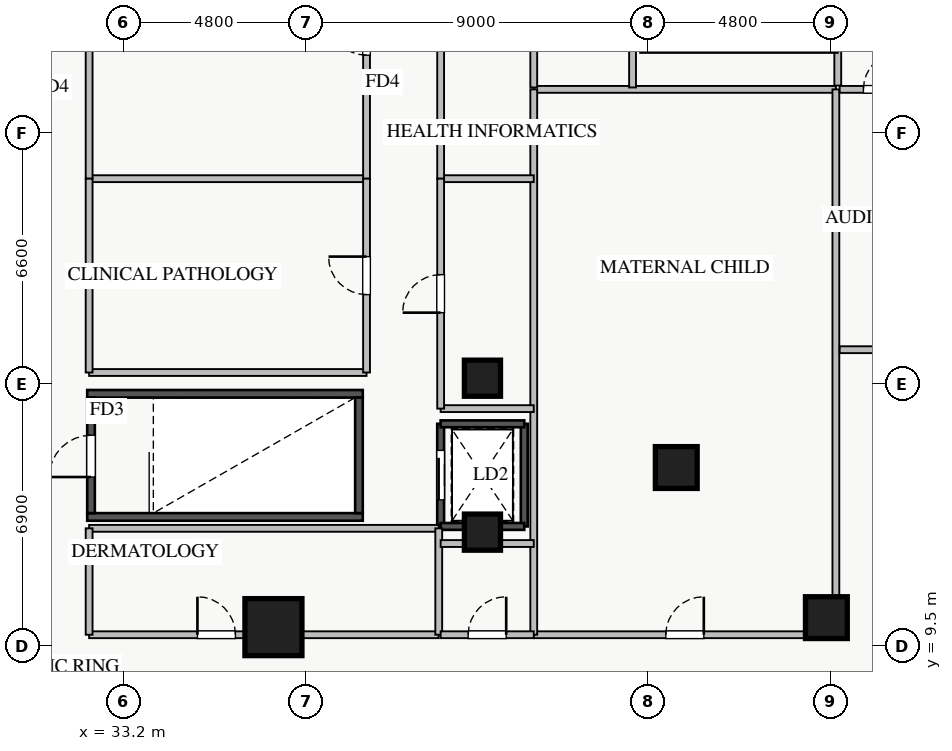
"""IFC4 building model, lengths in metres.
Left out: names, types, materials, properties, quantities, classifications, styles, units other than length and angle.
Written with IfcOpenShell. Run it as: python <this file> out.ifc"""

import sys

from ifc_helpers import new_model, si_unit, direction, frame, frame_2d, origin, origin_2d, place, context, subcontext, project, spatial, rectangle, extrude, source, transform, mapped, element, fill, save


model = new_model("IFC4")
c1 = context("Model", 3, precision=1e-05, world=origin(), true_north=direction((0.0, 1.0)))
c2 = subcontext(c1, "Body", "Model", "MODEL_VIEW")
j1 = project(units=[si_unit("LENGTHUNIT", "METRE"), si_unit("PLANEANGLEUNIT", "RADIAN")], contexts=[c1])
p1 = place(None, origin())
s1 = spatial("IfcSite", under=j1, at=p1, CompositionType="ELEMENT")
p2 = place(p1, origin())
s2 = spatial("IfcBuilding", under=s1, at=p2, CompositionType="ELEMENT")
p3 = place(p2, frame((0.0, 0.0, 18.2)))
s3 = spatial("IfcBuildingStorey", under=s2, at=p3, CompositionType="ELEMENT", Elevation=18.2)
p4 = place(p3, frame((41.55, 12.65, 0.0), z_axis=(0.0, 0.0, 1.0), x_axis=(0.0, 1.0, 0.0)))
e1 = element("IfcWall", 1, at=p4, inside=s3, PredefinedType="SHEAR", context=c2, shape_type="SweptSolid", body=[
    extrude(rectangle(XDim=2.7, YDim=0.18, at=frame_2d((1.35, 0.0))), origin(), (0.0, 0.0, 1.0), 4.62),
])
p5 = place(p4, frame((0.7, 0.0, 0.0)))
e2 = element("IfcOpeningElement", 2, at=p5, cuts=e1, PredefinedType="OPENING", context=c2, shape_type="SweptSolid", body=[
    extrude(rectangle(XDim=1.3, YDim=2.05, at=frame_2d((0.65, 1.025))), frame((0.0, 0.1, 0.0), z_axis=(0.0, -1.0, 0.0), x_axis=(1.0, 0.0, 0.0)), (0.0, 0.0, 1.0), 0.2),
])
p6 = place(p3, frame((43.75, 12.65, 0.0), z_axis=(0.0, 0.0, 1.0), x_axis=(0.0, 1.0, 0.0)))
e3 = element("IfcWall", 3, at=p6, inside=s3, PredefinedType="SHEAR", context=c2, shape_type="SweptSolid", body=[
    extrude(rectangle(XDim=2.7, YDim=0.18, at=frame_2d((1.35, 0.0))), origin(), (0.0, 0.0, 1.0), 4.62),
])
for number, where, z_axis, x_axis in (
    (4, (41.55, 12.65, 0.0), (0.0, 0.0, 1.0), (1.0, 0.0, 0.0)),
    (5, (41.55, 15.35, 0.0), (0.0, 0.0, 1.0), (1.0, 0.0, 0.0)),
):
    element("IfcWall", number, at=place(p3, frame(where, z_axis=z_axis, x_axis=x_axis)), inside=s3, PredefinedType="SHEAR", context=c2, shape_type="SweptSolid", body=[
        extrude(rectangle(XDim=2.2, YDim=0.18, at=frame_2d((1.1, 0.0))), origin(), (0.0, 0.0, 1.0), 4.62),
    ])
for number, where, z_axis, x_axis in (
    (6, (32.25, 12.9, 0.0), (0.0, 0.0, 1.0), (1.0, 0.0, 0.0)),
    (7, (32.25, 16.14, 0.0), (0.0, 0.0, 1.0), (1.0, 0.0, 0.0)),
):
    element("IfcWall", number, at=place(p3, frame(where, z_axis=z_axis, x_axis=x_axis)), inside=s3, PredefinedType="SHEAR", context=c2, shape_type="SweptSolid", body=[
        extrude(rectangle(XDim=7.25, YDim=0.2, at=frame_2d((3.625, 0.0))), origin(), (0.0, 0.0, 1.0), 4.8),
    ])
p7 = place(p3, frame((32.35, 13.0, 0.0), z_axis=(0.0, 0.0, 1.0), x_axis=(0.0, 1.0, 0.0)))
e8 = element("IfcWall", 8, at=p7, inside=s3, PredefinedType="SHEAR", context=c2, shape_type="SweptSolid", body=[
    extrude(rectangle(XDim=3.04, YDim=0.2, at=frame_2d((1.52, 0.0))), origin(), (0.0, 0.0, 1.0), 4.8),
])
p8 = place(p7, frame((0.95, 0.0, 0.0)))
e9 = element("IfcOpeningElement", 9, at=p8, cuts=e8, PredefinedType="OPENING", context=c2, shape_type="SweptSolid", body=[
    extrude(rectangle(XDim=1.1, YDim=2.05, at=frame_2d((0.55, 1.025))), frame((0.0, 0.11, 0.0), z_axis=(0.0, -1.0, 0.0), x_axis=(1.0, 0.0, 0.0)), (0.0, 0.0, 1.0), 0.22),
])
p9 = place(p3, frame((39.4, 13.0, 0.0), z_axis=(0.0, 0.0, 1.0), x_axis=(0.0, 1.0, 0.0)))
e10 = element("IfcWall", 10, at=p9, inside=s3, PredefinedType="SHEAR", context=c2, shape_type="SweptSolid", body=[
    extrude(rectangle(XDim=3.04, YDim=0.2, at=frame_2d((1.52, 0.0))), origin(), (0.0, 0.0, 1.0), 4.8),
])
m1 = source(origin(), c2, "Body", "SweptSolid", [
    extrude(rectangle(XDim=1.5, YDim=1.5, at=origin_2d()), origin(), (0.0, 0.0, 1.0), 4.8),
])
p10 = place(p3, frame((37.15, 10.0, 0.0), z_axis=(0.0, 0.0, 1.0), x_axis=(1.0, 0.0, 0.0)))
e11 = element("IfcColumn", 11, at=p10, inside=s3, PredefinedType="COLUMN", context=c2, shape_type="MappedRepresentation", body=[
    mapped(m1, transform((0.0, 0.0, 0.0), x_axis=(1.0, 0.0, 0.0), y_axis=(0.0, 1.0, 0.0), z_axis=(0.0, 0.0, 1.0), scale=1.0)),
])
m2 = source(origin(), c2, "Body", "SweptSolid", [
    extrude(rectangle(XDim=1.1, YDim=1.1, at=origin_2d()), origin(), (0.0, 0.0, 1.0), 4.8),
])
for number, where, z_axis, x_axis in (
    (12, (51.7, 10.25, 0.0), (0.0, 0.0, 1.0), (1.0, 0.0, 0.0)),
    (13, (47.75, 14.2, 0.0), (0.0, 0.0, 1.0), (1.0, 0.0, 0.0)),
):
    element("IfcColumn", number, at=place(p3, frame(where, z_axis=z_axis, x_axis=x_axis)), inside=s3, PredefinedType="COLUMN", context=c2, shape_type="MappedRepresentation", body=[
        mapped(m2, transform((0.0, 0.0, 0.0), x_axis=(1.0, 0.0, 0.0), y_axis=(0.0, 1.0, 0.0), z_axis=(0.0, 0.0, 1.0), scale=1.0)),
    ])
m3 = source(origin(), c2, "Body", "SweptSolid", [
    extrude(rectangle(XDim=0.95, YDim=0.95, at=origin_2d()), origin(), (0.0, 0.0, 1.0), 4.8),
])
for number, where, z_axis, x_axis in (
    (14, (42.65, 12.5, 0.0), (0.0, 0.0, 1.0), (1.0, 0.0, 0.0)),
    (15, (42.65, 16.55, 0.0), (0.0, 0.0, 1.0), (1.0, 0.0, 0.0)),
):
    element("IfcColumn", number, at=place(p3, frame(where, z_axis=z_axis, x_axis=x_axis)), inside=s3, PredefinedType="COLUMN", context=c2, shape_type="MappedRepresentation", body=[
        mapped(m3, transform((0.0, 0.0, 0.0), x_axis=(1.0, 0.0, 0.0), y_axis=(0.0, 1.0, 0.0), z_axis=(0.0, 0.0, 1.0), scale=1.0)),
    ])
p11 = place(p3, frame((52.0, 24.25, 0.0), z_axis=(0.0, 0.0, 1.0), x_axis=(0.0, 1.0, 0.0)))
e16 = element("IfcWall", 16, at=p11, inside=s3, PredefinedType="PARTITIONING", context=c2, shape_type="SweptSolid", body=[
    extrude(rectangle(XDim=11.55, YDim=0.18, at=frame_2d((5.775, 0.0))), origin(), (0.0, 0.0, 1.0), 4.62),
])
p12 = place(p11, frame((2.325, 0.0, 0.0)))
e17 = element("IfcOpeningElement", 17, at=p12, cuts=e16, PredefinedType="OPENING", context=c2, shape_type="SweptSolid", body=[
    extrude(rectangle(XDim=0.85, YDim=2.05, at=frame_2d((0.425, 1.025))), frame((0.0, 0.1, 0.0), z_axis=(0.0, -1.0, 0.0), x_axis=(1.0, 0.0, 0.0)), (0.0, 0.0, 1.0), 0.2),
])
p13 = place(p11, frame((5.93, 0.0, 0.0)))
e18 = element("IfcOpeningElement", 18, at=p13, cuts=e16, PredefinedType="OPENING", context=c2, shape_type="SweptSolid", body=[
    extrude(rectangle(XDim=0.85, YDim=2.05, at=frame_2d((0.425, 1.025))), frame((0.0, 0.1, 0.0), z_axis=(0.0, -1.0, 0.0), x_axis=(1.0, 0.0, 0.0)), (0.0, 0.0, 1.0), 0.2),
])
p14 = place(p11, frame((9.43, 0.0, 0.0)))
e19 = element("IfcOpeningElement", 19, at=p14, cuts=e16, PredefinedType="OPENING", context=c2, shape_type="SweptSolid", body=[
    extrude(rectangle(XDim=0.85, YDim=2.05, at=frame_2d((0.425, 1.025))), frame((0.0, 0.1, 0.0), z_axis=(0.0, -1.0, 0.0), x_axis=(1.0, 0.0, 0.0)), (0.0, 0.0, 1.0), 0.2),
])
p15 = place(p3, frame((46.8, 25.2, 0.0), z_axis=(0.0, 0.0, 1.0), x_axis=(1.0, 0.0, 0.0)))
e20 = element("IfcWall", 20, at=p15, inside=s3, PredefinedType="PARTITIONING", context=c2, shape_type="SweptSolid", body=[
    extrude(rectangle(XDim=5.2, YDim=0.18, at=frame_2d((2.6, 0.0))), origin(), (0.0, 0.0, 1.0), 4.62),
])
p16 = place(p3, frame((32.3, 21.8, 0.0), z_axis=(0.0, 0.0, 1.0), x_axis=(1.0, 0.0, 0.0)))
e21 = element("IfcWall", 21, at=p16, inside=s3, PredefinedType="PARTITIONING", context=c2, shape_type="SweptSolid", body=[
    extrude(rectangle(XDim=7.3, YDim=0.18, at=frame_2d((3.65, 0.0))), origin(), (0.0, 0.0, 1.0), 4.62),
])
p17 = place(p3, frame((32.3, 21.8, 0.0), z_axis=(0.0, 0.0, 1.0), x_axis=(0.0, 1.0, 0.0)))
e22 = element("IfcWall", 22, at=p17, inside=s3, PredefinedType="PARTITIONING", context=c2, shape_type="SweptSolid", body=[
    extrude(rectangle(XDim=7.5, YDim=0.18, at=frame_2d((3.75, 0.0))), origin(), (0.0, 0.0, 1.0), 4.62),
])
p18 = place(p3, frame((39.6, 21.8, 0.0), z_axis=(0.0, 0.0, 1.0), x_axis=(0.0, 1.0, 0.0)))
e23 = element("IfcWall", 23, at=p18, inside=s3, PredefinedType="PARTITIONING", context=c2, shape_type="SweptSolid", body=[
    extrude(rectangle(XDim=7.5, YDim=0.18, at=frame_2d((3.75, 0.0))), origin(), (0.0, 0.0, 1.0), 4.62),
])
p19 = place(p18, frame((3.25, 0.0, 0.0)))
e24 = element("IfcOpeningElement", 24, at=p19, cuts=e23, PredefinedType="OPENING", context=c2, shape_type="SweptSolid", body=[
    extrude(rectangle(XDim=1.0, YDim=2.05, at=frame_2d((0.5, 1.025))), frame((0.0, 0.1, 0.0), z_axis=(0.0, -1.0, 0.0), x_axis=(1.0, 0.0, 0.0)), (0.0, 0.0, 1.0), 0.2),
])
p20 = place(p3, frame((32.3, 16.7, 0.0), z_axis=(0.0, 0.0, 1.0), x_axis=(1.0, 0.0, 0.0)))
e25 = element("IfcWall", 25, at=p20, inside=s3, PredefinedType="PARTITIONING", context=c2, shape_type="SweptSolid", body=[
    extrude(rectangle(XDim=7.3, YDim=0.18, at=frame_2d((3.65, 0.0))), origin(), (0.0, 0.0, 1.0), 3.915),
])
p21 = place(p3, frame((32.3, 16.7, 0.0), z_axis=(0.0, 0.0, 1.0), x_axis=(0.0, 1.0, 0.0)))
e26 = element("IfcWall", 26, at=p21, inside=s3, PredefinedType="PARTITIONING", context=c2, shape_type="SweptSolid", body=[
    extrude(rectangle(XDim=5.1, YDim=0.18, at=frame_2d((2.55, 0.0))), origin(), (0.0, 0.0, 1.0), 4.62),
])
p22 = place(p3, frame((39.6, 16.7, 0.0), z_axis=(0.0, 0.0, 1.0), x_axis=(0.0, 1.0, 0.0)))
e27 = element("IfcWall", 27, at=p22, inside=s3, PredefinedType="PARTITIONING", context=c2, shape_type="SweptSolid", body=[
    extrude(rectangle(XDim=5.1, YDim=0.18, at=frame_2d((2.55, 0.0))), origin(), (0.0, 0.0, 1.0), 4.62),
])
p23 = place(p22, frame((2.05, 0.0, 0.0)))
e28 = element("IfcOpeningElement", 28, at=p23, cuts=e27, PredefinedType="OPENING", context=c2, shape_type="SweptSolid", body=[
    extrude(rectangle(XDim=1.0, YDim=2.05, at=frame_2d((0.5, 1.025))), frame((0.0, 0.1, 0.0), z_axis=(0.0, -1.0, 0.0), x_axis=(1.0, 0.0, 0.0)), (0.0, 0.0, 1.0), 0.2),
])
p24 = place(p3, frame((32.3, 9.8, 0.0), z_axis=(0.0, 0.0, 1.0), x_axis=(1.0, 0.0, 0.0)))
e29 = element("IfcWall", 29, at=p24, inside=s3, PredefinedType="PARTITIONING", context=c2, shape_type="SweptSolid", body=[
    extrude(rectangle(XDim=9.2, YDim=0.18, at=frame_2d((4.6, 0.0))), origin(), (0.0, 0.0, 1.0), 4.62),
])
p25 = place(p24, frame((2.85, 0.0, 0.0)))
e30 = element("IfcOpeningElement", 30, at=p25, cuts=e29, PredefinedType="OPENING", context=c2, shape_type="SweptSolid", body=[
    extrude(rectangle(XDim=1.0, YDim=2.05, at=frame_2d((0.5, 1.025))), frame((0.0, 0.1, 0.0), z_axis=(0.0, -1.0, 0.0), x_axis=(1.0, 0.0, 0.0)), (0.0, 0.0, 1.0), 0.2),
])
p26 = place(p3, frame((32.3, 12.6, 0.0), z_axis=(0.0, 0.0, 1.0), x_axis=(1.0, 0.0, 0.0)))
e31 = element("IfcWall", 31, at=p26, inside=s3, PredefinedType="PARTITIONING", context=c2, shape_type="SweptSolid", body=[
    extrude(rectangle(XDim=9.2, YDim=0.18, at=frame_2d((4.6, 0.0))), origin(), (0.0, 0.0, 1.0), 3.915),
])
for number, where, z_axis, x_axis in (
    (32, (32.3, 9.8, 0.0), (0.0, 0.0, 1.0), (0.0, 1.0, 0.0)),
    (33, (41.5, 9.8, 0.0), (0.0, 0.0, 1.0), (0.0, 1.0, 0.0)),
):
    element("IfcWall", number, at=place(p3, frame(where, z_axis=z_axis, x_axis=x_axis)), inside=s3, PredefinedType="PARTITIONING", context=c2, shape_type="SweptSolid", body=[
        extrude(rectangle(XDim=2.8, YDim=0.18, at=frame_2d((1.4, 0.0))), origin(), (0.0, 0.0, 1.0), 4.62),
    ])
p27 = place(p3, frame((44.0, 9.8, 0.0), z_axis=(0.0, 0.0, 1.0), x_axis=(1.0, 0.0, 0.0)))
e34 = element("IfcWall", 34, at=p27, inside=s3, PredefinedType="PARTITIONING", context=c2, shape_type="SweptSolid", body=[
    extrude(rectangle(XDim=7.95, YDim=0.18, at=frame_2d((3.975, 0.0))), origin(), (0.0, 0.0, 1.0), 4.62),
])
p28 = place(p27, frame((3.475, 0.0, 0.0)))
e35 = element("IfcOpeningElement", 35, at=p28, cuts=e34, PredefinedType="OPENING", context=c2, shape_type="SweptSolid", body=[
    extrude(rectangle(XDim=1.0, YDim=2.05, at=frame_2d((0.5, 1.025))), frame((0.0, 0.1, 0.0), z_axis=(0.0, -1.0, 0.0), x_axis=(1.0, 0.0, 0.0)), (0.0, 0.0, 1.0), 0.2),
])
p29 = place(p3, frame((44.0, 24.15, 0.0), z_axis=(0.0, 0.0, 1.0), x_axis=(1.0, 0.0, 0.0)))
e36 = element("IfcWall", 36, at=p29, inside=s3, PredefinedType="PARTITIONING", context=c2, shape_type="SweptSolid", body=[
    extrude(rectangle(XDim=7.95, YDim=0.18, at=frame_2d((3.975, 0.0))), origin(), (0.0, 0.0, 1.0), 4.62),
])
for number, where, z_axis, x_axis in (
    (37, (44.0, 9.8, 0.0), (0.0, 0.0, 1.0), (0.0, 1.0, 0.0)),
    (38, (51.95, 9.8, 0.0), (0.0, 0.0, 1.0), (0.0, 1.0, 0.0)),
):
    element("IfcWall", number, at=place(p3, frame(where, z_axis=z_axis, x_axis=x_axis)), inside=s3, PredefinedType="PARTITIONING", context=c2, shape_type="SweptSolid", body=[
        extrude(rectangle(XDim=14.35, YDim=0.18, at=frame_2d((7.175, 0.0))), origin(), (0.0, 0.0, 1.0), 4.62),
    ])
for number, where, z_axis, x_axis in (
    (39, (44.0, 24.2, 0.0), (0.0, 0.0, 1.0), (0.0, 1.0, 0.0)),
    (40, (46.6, 24.2, 0.0), (0.0, 0.0, 1.0), (0.0, 1.0, 0.0)),
):
    element("IfcWall", number, at=place(p3, frame(where, z_axis=z_axis, x_axis=x_axis)), inside=s3, PredefinedType="PARTITIONING", context=c2, shape_type="SweptSolid", body=[
        extrude(rectangle(XDim=12.0, YDim=0.18, at=frame_2d((6.0, 0.0))), origin(), (0.0, 0.0, 1.0), 4.62),
    ])
p30 = place(p3, frame((41.55, 21.8, 0.0), z_axis=(0.0, 0.0, 1.0), x_axis=(1.0, 0.0, 0.0)))
e41 = element("IfcWall", 41, at=p30, inside=s3, PredefinedType="PARTITIONING", context=c2, shape_type="SweptSolid", body=[
    extrude(rectangle(XDim=2.45, YDim=0.18, at=frame_2d((1.225, 0.0))), origin(), (0.0, 0.0, 1.0), 4.62),
])
p31 = place(p3, frame((41.55, 21.8, 0.0), z_axis=(0.0, 0.0, 1.0), x_axis=(0.0, 1.0, 0.0)))
e42 = element("IfcWall", 42, at=p31, inside=s3, PredefinedType="PARTITIONING", context=c2, shape_type="SweptSolid", body=[
    extrude(rectangle(XDim=8.45, YDim=0.18, at=frame_2d((4.225, 0.0))), origin(), (0.0, 0.0, 1.0), 4.62),
])
p32 = place(p31, frame((3.725, 0.0, 0.0)))
e43 = element("IfcOpeningElement", 43, at=p32, cuts=e42, PredefinedType="OPENING", context=c2, shape_type="SweptSolid", body=[
    extrude(rectangle(XDim=1.0, YDim=2.05, at=frame_2d((0.5, 1.025))), frame((0.0, 0.1, 0.0), z_axis=(0.0, -1.0, 0.0), x_axis=(1.0, 0.0, 0.0)), (0.0, 0.0, 1.0), 0.2),
])
p33 = place(p3, frame((41.55, 15.75, 0.0), z_axis=(0.0, 0.0, 1.0), x_axis=(1.0, 0.0, 0.0)))
e44 = element("IfcWall", 44, at=p33, inside=s3, PredefinedType="PARTITIONING", context=c2, shape_type="SweptSolid", body=[
    extrude(rectangle(XDim=2.45, YDim=0.18, at=frame_2d((1.225, 0.0))), origin(), (0.0, 0.0, 1.0), 4.62),
])
p34 = place(p3, frame((41.55, 15.75, 0.0), z_axis=(0.0, 0.0, 1.0), x_axis=(0.0, 1.0, 0.0)))
e45 = element("IfcWall", 45, at=p34, inside=s3, PredefinedType="PARTITIONING", context=c2, shape_type="SweptSolid", body=[
    extrude(rectangle(XDim=6.05, YDim=0.18, at=frame_2d((3.025, 0.0))), origin(), (0.0, 0.0, 1.0), 4.62),
])
p35 = place(p34, frame((2.525, 0.0, 0.0)))
e46 = element("IfcOpeningElement", 46, at=p35, cuts=e45, PredefinedType="OPENING", context=c2, shape_type="SweptSolid", body=[
    extrude(rectangle(XDim=1.0, YDim=2.05, at=frame_2d((0.5, 1.025))), frame((0.0, 0.1, 0.0), z_axis=(0.0, -1.0, 0.0), x_axis=(1.0, 0.0, 0.0)), (0.0, 0.0, 1.0), 0.2),
])
p36 = place(p3, frame((41.55, 9.8, 0.0), z_axis=(0.0, 0.0, 1.0), x_axis=(1.0, 0.0, 0.0)))
e47 = element("IfcWall", 47, at=p36, inside=s3, PredefinedType="PARTITIONING", context=c2, shape_type="SweptSolid", body=[
    extrude(rectangle(XDim=2.45, YDim=0.18, at=frame_2d((1.225, 0.0))), origin(), (0.0, 0.0, 1.0), 4.62),
])
p37 = place(p36, frame((0.725, 0.0, 0.0)))
e48 = element("IfcOpeningElement", 48, at=p37, cuts=e47, PredefinedType="OPENING", context=c2, shape_type="SweptSolid", body=[
    extrude(rectangle(XDim=1.0, YDim=2.05, at=frame_2d((0.5, 1.025))), frame((0.0, 0.1, 0.0), z_axis=(0.0, -1.0, 0.0), x_axis=(1.0, 0.0, 0.0)), (0.0, 0.0, 1.0), 0.2),
])
p38 = place(p3, frame((41.55, 12.2, 0.0), z_axis=(0.0, 0.0, 1.0), x_axis=(1.0, 0.0, 0.0)))
e49 = element("IfcWall", 49, at=p38, inside=s3, PredefinedType="PARTITIONING", context=c2, shape_type="SweptSolid", body=[
    extrude(rectangle(XDim=2.45, YDim=0.18, at=frame_2d((1.225, 0.0))), origin(), (0.0, 0.0, 1.0), 3.915),
])
p39 = place(p3, frame((52.05, 17.3, 0.0), z_axis=(0.0, 0.0, 1.0), x_axis=(1.0, 0.0, 0.0)))
e50 = element("IfcWall", 50, at=p39, inside=s3, PredefinedType="PARTITIONING", context=c2, shape_type="SweptSolid", body=[
    extrude(rectangle(XDim=2.25, YDim=0.18, at=frame_2d((1.125, 0.0))), origin(), (0.0, 0.0, 1.0), 4.62),
])
p40 = place(p3, frame((52.05, 24.15, 0.0), z_axis=(0.0, 0.0, 1.0), x_axis=(1.0, 0.0, 0.0)))
e51 = element("IfcWall", 51, at=p40, inside=s3, PredefinedType="PARTITIONING", context=c2, shape_type="SweptSolid", body=[
    extrude(rectangle(XDim=2.25, YDim=0.18, at=frame_2d((1.125, 0.0))), origin(), (0.0, 0.0, 1.0), 4.62),
])
p41 = place(p40, frame((0.625, 0.0, 0.0)))
e52 = element("IfcOpeningElement", 52, at=p41, cuts=e51, PredefinedType="OPENING", context=c2, shape_type="SweptSolid", body=[
    extrude(rectangle(XDim=1.0, YDim=2.05, at=frame_2d((0.5, 1.025))), frame((0.0, 0.1, 0.0), z_axis=(0.0, -1.0, 0.0), x_axis=(1.0, 0.0, 0.0)), (0.0, 0.0, 1.0), 0.2),
])
m4 = source(origin(), c2, "Body", "SweptSolid", [
    extrude(rectangle(XDim=1.1, YDim=2.05, at=frame_2d((0.55, 1.025))), frame((0.0, 0.025, 0.0), z_axis=(0.0, -1.0, 0.0), x_axis=(1.0, 0.0, 0.0)), (0.0, 0.0, 1.0), 0.05),
])
p42 = place(p8, origin())
e53 = element("IfcDoor", 53, at=p42, inside=s3, OperationType="SINGLE_SWING_LEFT", PredefinedType="DOOR", context=c2, shape_type="MappedRepresentation", body=[
    mapped(m4, transform((0.0, 0.0, 0.0), x_axis=(1.0, 0.0, 0.0), y_axis=(0.0, 1.0, 0.0), z_axis=(0.0, 0.0, 1.0), scale=1.0)),
])
fill(e9, e53)
m5 = source(origin(), c2, "Body", "SweptSolid", [
    extrude(rectangle(XDim=1.3, YDim=2.05, at=frame_2d((0.65, 1.025))), frame((0.0, 0.025, 0.0), z_axis=(0.0, -1.0, 0.0), x_axis=(1.0, 0.0, 0.0)), (0.0, 0.0, 1.0), 0.05),
])
p43 = place(p5, origin())
e54 = element("IfcDoor", 54, at=p43, inside=s3, OperationType="SLIDING_TO_LEFT", PredefinedType="DOOR", context=c2, shape_type="MappedRepresentation", body=[
    mapped(m5, transform((0.0, 0.0, 0.0), x_axis=(1.0, 0.0, 0.0), y_axis=(0.0, 1.0, 0.0), z_axis=(0.0, 0.0, 1.0), scale=1.0)),
])
fill(e2, e54)
m6 = source(origin(), c2, "Body", "SweptSolid", [
    extrude(rectangle(XDim=1.0, YDim=2.05, at=frame_2d((0.5, 1.025))), frame((0.0, 0.025, 0.0), z_axis=(0.0, -1.0, 0.0), x_axis=(1.0, 0.0, 0.0)), (0.0, 0.0, 1.0), 0.05),
])
p44 = place(p19, origin())
e55 = element("IfcDoor", 55, at=p44, inside=s3, OperationType="SINGLE_SWING_RIGHT", PredefinedType="DOOR", context=c2, shape_type="MappedRepresentation", body=[
    mapped(m6, transform((0.0, 0.0, 0.0), x_axis=(1.0, 0.0, 0.0), y_axis=(0.0, 1.0, 0.0), z_axis=(0.0, 0.0, 1.0), scale=1.0)),
])
fill(e24, e55)
p45 = place(p23, origin())
e56 = element("IfcDoor", 56, at=p45, inside=s3, OperationType="SINGLE_SWING_RIGHT", PredefinedType="DOOR", context=c2, shape_type="MappedRepresentation", body=[
    mapped(m6, transform((0.0, 0.0, 0.0), x_axis=(1.0, 0.0, 0.0), y_axis=(0.0, 1.0, 0.0), z_axis=(0.0, 0.0, 1.0), scale=1.0)),
])
fill(e28, e56)
p46 = place(p25, origin())
e57 = element("IfcDoor", 57, at=p46, inside=s3, OperationType="SINGLE_SWING_LEFT", PredefinedType="DOOR", context=c2, shape_type="MappedRepresentation", body=[
    mapped(m6, transform((0.0, 0.0, 0.0), x_axis=(1.0, 0.0, 0.0), y_axis=(0.0, 1.0, 0.0), z_axis=(0.0, 0.0, 1.0), scale=1.0)),
])
fill(e30, e57)
p47 = place(p28, origin())
e58 = element("IfcDoor", 58, at=p47, inside=s3, OperationType="SINGLE_SWING_RIGHT", PredefinedType="DOOR", context=c2, shape_type="MappedRepresentation", body=[
    mapped(m6, transform((0.0, 0.0, 0.0), x_axis=(1.0, 0.0, 0.0), y_axis=(0.0, 1.0, 0.0), z_axis=(0.0, 0.0, 1.0), scale=1.0)),
])
fill(e35, e58)
p48 = place(p35, origin())
e59 = element("IfcDoor", 59, at=p48, inside=s3, OperationType="SINGLE_SWING_LEFT", PredefinedType="DOOR", context=c2, shape_type="MappedRepresentation", body=[
    mapped(m6, transform((0.0, 0.0, 0.0), x_axis=(1.0, 0.0, 0.0), y_axis=(0.0, 1.0, 0.0), z_axis=(0.0, 0.0, 1.0), scale=1.0)),
])
fill(e46, e59)
p49 = place(p37, origin())
e60 = element("IfcDoor", 60, at=p49, inside=s3, OperationType="SINGLE_SWING_RIGHT", PredefinedType="DOOR", context=c2, shape_type="MappedRepresentation", body=[
    mapped(m6, transform((0.0, 0.0, 0.0), x_axis=(1.0, 0.0, 0.0), y_axis=(0.0, 1.0, 0.0), z_axis=(0.0, 0.0, 1.0), scale=1.0)),
])
fill(e48, e60)
p50 = place(p41, origin())
e61 = element("IfcDoor", 61, at=p50, inside=s3, OperationType="SINGLE_SWING_RIGHT", PredefinedType="DOOR", context=c2, shape_type="MappedRepresentation", body=[
    mapped(m6, transform((0.0, 0.0, 0.0), x_axis=(1.0, 0.0, 0.0), y_axis=(0.0, 1.0, 0.0), z_axis=(0.0, 0.0, 1.0), scale=1.0)),
])
fill(e52, e61)
save(model, sys.argv[1])
